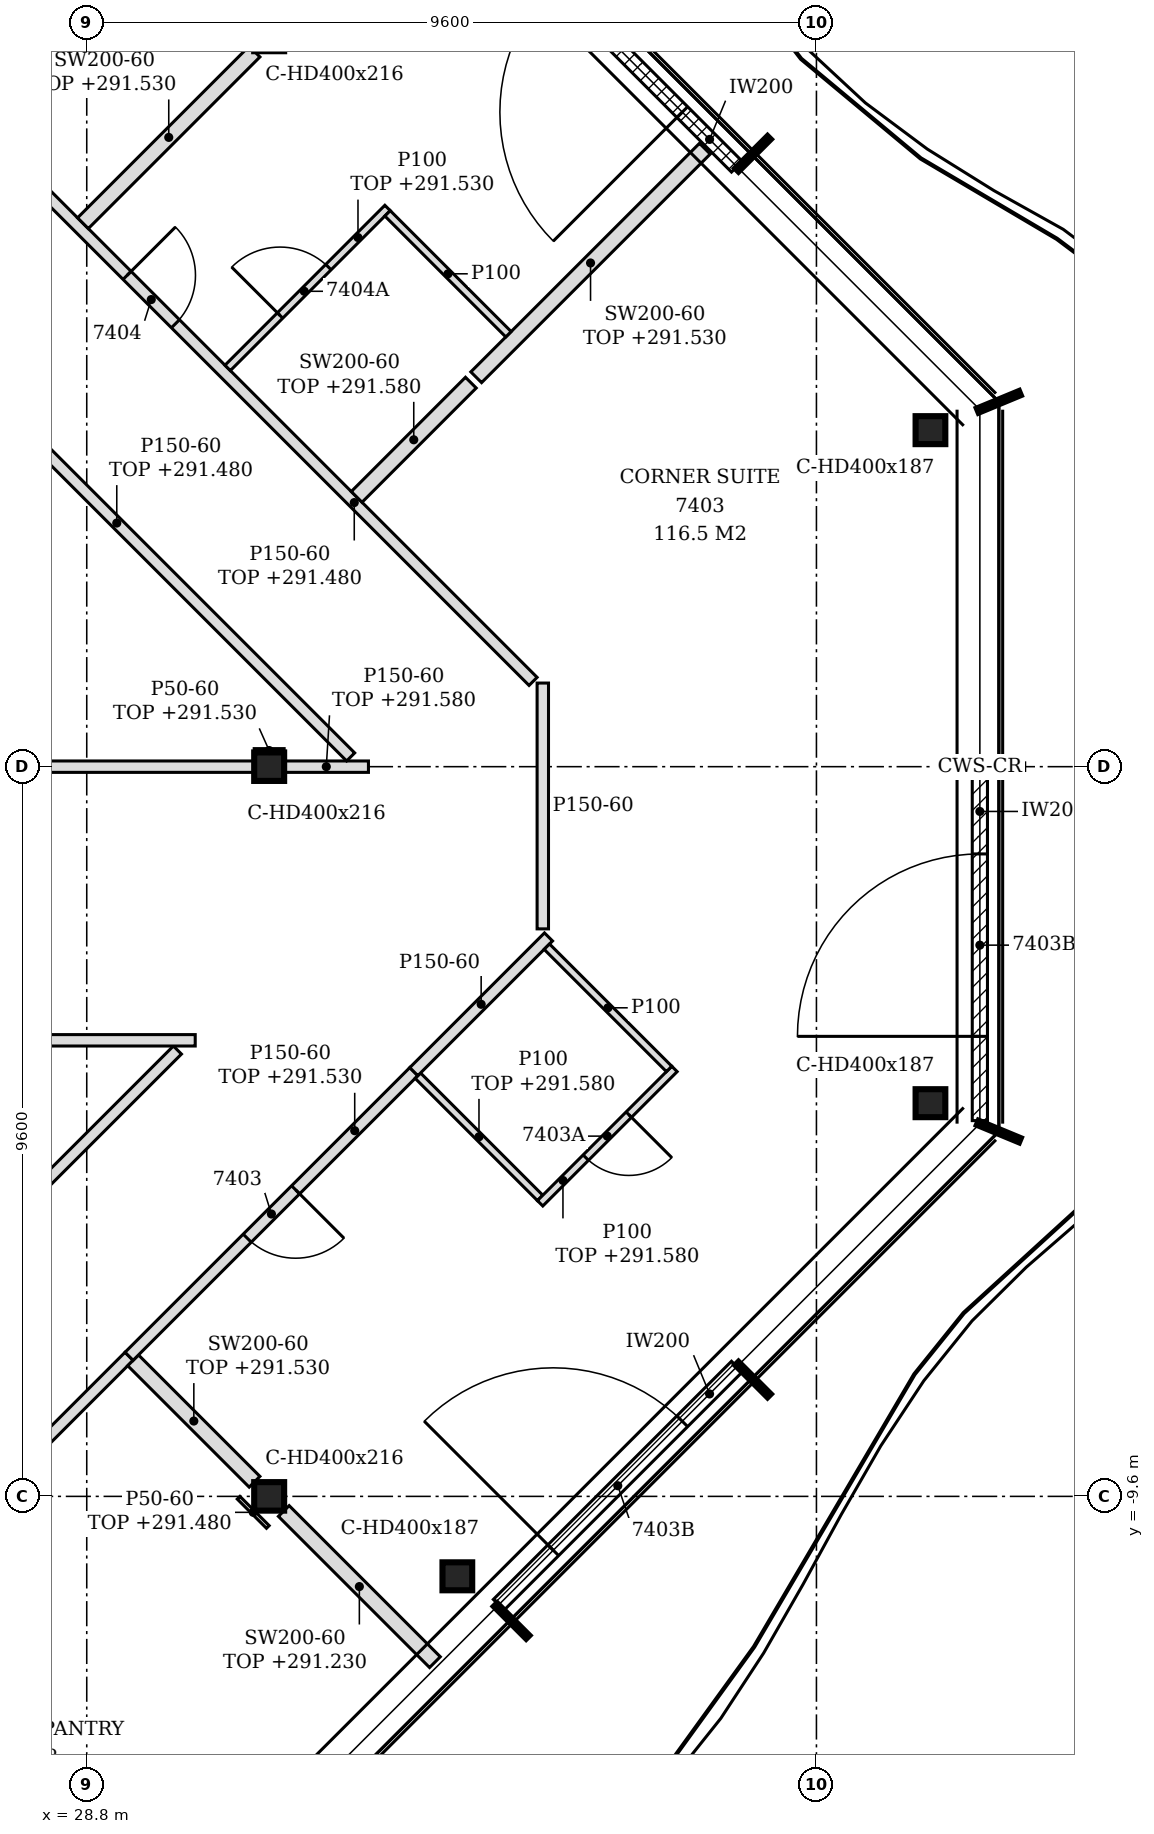
"""IFC4 building model, lengths in metres.
Left out: names, types, materials, properties, quantities, classifications, styles, units other than length and angle.
Written with IfcOpenShell. Run it as: python <this file> out.ifc"""

import sys

from ifc_helpers import new_model, si_unit, direction, frame, frame_2d, origin, origin_2d, place, context, subcontext, project, spatial, polyline, rectangle, i_section, outline, extrude, element, fill, save


model = new_model("IFC4")
c1 = context("Model", 3, precision=1e-05, world=origin(), true_north=direction((0.0, 1.0)))
c2 = subcontext(c1, "Body", "Model", "MODEL_VIEW")
j1 = project(units=[si_unit("LENGTHUNIT", "METRE"), si_unit("PLANEANGLEUNIT", "RADIAN")], contexts=[c1])
p1 = place(None, origin())
s1 = spatial("IfcSite", under=j1, at=p1, CompositionType="ELEMENT")
p2 = place(p1, origin())
s2 = spatial("IfcBuilding", under=s1, at=p2, CompositionType="ELEMENT")
p3 = place(p2, frame((0.0, 0.0, 288.6)))
s3 = spatial("IfcBuildingStorey", under=s2, at=p3, CompositionType="ELEMENT", Elevation=288.6)
for number, where, z_axis, x_axis in (
    (1, (33.676, -10.652, -0.15), (0.0, 0.0, 1.0), (1.0, 0.0, 0.0)),
    (2, (39.9, -4.427, -0.15), (0.0, 0.0, 1.0), (1.0, 0.0, 0.0)),
    (3, (39.9, 4.427, -0.15), (0.0, 0.0, 1.0), (1.0, 0.0, 0.0)),
):
    element("IfcColumn", number, at=place(p3, frame(where, z_axis=z_axis, x_axis=x_axis)), inside=s3, PredefinedType="COLUMN", context=c2, shape_type="SweptSolid", body=[
        extrude(i_section(OverallWidth=0.391, OverallDepth=0.368, WebThickness=0.015, FlangeThickness=0.024, FilletRadius=0.015, at=origin_2d()), origin(), (0.0, 0.0, 1.0), 3.6),
    ])
for number, where, z_axis, x_axis in (
    (4, (31.2, -9.6, -0.15), (0.0, 0.0, 1.0), (1.0, 0.0, 0.0)),
    (5, (31.2, 0.0, -0.15), (0.0, 0.0, 1.0), (1.0, 0.0, 0.0)),
):
    element("IfcColumn", number, at=place(p3, frame(where, z_axis=z_axis, x_axis=x_axis)), inside=s3, PredefinedType="COLUMN", context=c2, shape_type="SweptSolid", body=[
        extrude(i_section(OverallWidth=0.394, OverallDepth=0.375, WebThickness=0.017, FlangeThickness=0.028, FilletRadius=0.015, at=origin_2d()), origin(), (0.0, 0.0, 1.0), 3.6),
    ])
p4 = place(p3, frame((34.22, -11.026, 0.0), z_axis=(0.0, 0.0, 1.0), x_axis=(0.707134329907, 0.707079231393, 0.0)))
e6 = element("IfcWall", 6, at=p4, inside=s3, PredefinedType="NOTDEFINED", context=c2, shape_type="SweptSolid", body=[
    extrude(rectangle(XDim=4.431, YDim=0.2, at=frame_2d((2.215, 0.0))), origin(), (0.0, 0.0, 1.0), 3.45),
])
p5 = place(p4, frame((1.015, 0.0, 0.0)))
e7 = element("IfcOpeningElement", 7, at=p5, cuts=e6, PredefinedType="OPENING", context=c2, shape_type="SweptSolid", body=[
    extrude(rectangle(XDim=2.4, YDim=2.4, at=frame_2d((1.2, 1.2))), frame((0.0, 0.11, 0.0), z_axis=(0.0, -1.0, 0.0), x_axis=(1.0, 0.0, 0.0)), (0.0, 0.0, 1.0), 0.22),
])
p6 = place(p3, frame((40.55, -4.656, 0.0), z_axis=(0.0, 0.0, 1.0), x_axis=(0.0, 1.0, 0.0)))
e8 = element("IfcWall", 8, at=p6, inside=s3, PredefinedType="NOTDEFINED", context=c2, shape_type="SweptSolid", body=[
    extrude(rectangle(XDim=4.626, YDim=0.2, at=frame_2d((2.313, 0.0))), origin(), (0.0, 0.0, 1.0), 3.45),
])
p7 = place(p6, frame((1.108, 0.0, 0.0)))
e9 = element("IfcOpeningElement", 9, at=p7, cuts=e8, PredefinedType="OPENING", context=c2, shape_type="SweptSolid", body=[
    extrude(rectangle(XDim=2.4, YDim=2.4, at=frame_2d((1.2, 1.2))), frame((0.0, 0.11, 0.0), z_axis=(0.0, -1.0, 0.0), x_axis=(1.0, 0.0, 0.0)), (0.0, 0.0, 1.0), 0.22),
])
p8 = place(p3, frame((37.353, 7.893, 0.0), z_axis=(0.0, 0.0, 1.0), x_axis=(-0.707134329907, 0.707079231393, 0.0)))
e10 = element("IfcWall", 10, at=p8, inside=s3, PredefinedType="NOTDEFINED", context=c2, shape_type="SweptSolid", body=[
    extrude(rectangle(XDim=4.431, YDim=0.2, at=frame_2d((2.215, 0.0))), origin(), (0.0, 0.0, 1.0), 3.45),
])
p9 = place(p8, frame((1.016, 0.0, 0.0)))
e11 = element("IfcOpeningElement", 11, at=p9, cuts=e10, PredefinedType="OPENING", context=c2, shape_type="SweptSolid", body=[
    extrude(rectangle(XDim=2.4, YDim=2.4, at=frame_2d((1.2, 1.2))), frame((0.0, 0.11, 0.0), z_axis=(0.0, -1.0, 0.0), x_axis=(1.0, 0.0, 0.0)), (0.0, 0.0, 1.0), 0.22),
])
p10 = place(p3, frame((23.845, -13.27, 0.0), z_axis=(0.0, 0.0, 1.0), x_axis=(0.707044144392, 0.707169412433, 0.0)))
e12 = element("IfcWall", 12, at=p10, inside=s3, PredefinedType="PARTITIONING", context=c2, shape_type="SweptSolid", body=[
    extrude(rectangle(XDim=7.796, YDim=0.15, at=frame_2d((3.898, 0.0))), origin(), (0.0, 0.0, 1.0), 2.88),
])
p11 = place(p10, frame((3.448, 0.0, 0.0)))
e13 = element("IfcOpeningElement", 13, at=p11, cuts=e12, PredefinedType="OPENING", context=c2, shape_type="SweptSolid", body=[
    extrude(rectangle(XDim=0.9, YDim=2.1, at=frame_2d((0.45, 1.05))), frame((0.0, 0.085, 0.0), z_axis=(0.0, -1.0, 0.0), x_axis=(1.0, 0.0, 0.0)), (0.0, 0.0, 1.0), 0.17),
])
p12 = place(p3, frame((33.381, -11.781, 0.0), z_axis=(0.0, 0.0, 1.0), x_axis=(-0.707106781187, 0.707106781187, 0.0)))
e14 = element("IfcWall", 14, at=p12, inside=s3, PredefinedType="PARTITIONING", context=c2, shape_type="SweptSolid", body=[
    extrude(rectangle(XDim=2.812, YDim=0.2, at=frame_2d((1.406, 0.0))), origin(), (0.0, 0.0, 1.0), 2.63),
])
p13 = place(p3, frame((31.008, -9.408, 0.0), z_axis=(0.0, 0.0, 1.0), x_axis=(-0.707160802102, 0.707052756143, 0.0)))
e15 = element("IfcWall", 15, at=p13, inside=s3, PredefinedType="PARTITIONING", context=c2, shape_type="SweptSolid", body=[
    extrude(rectangle(XDim=2.26, YDim=0.2, at=frame_2d((1.13, 0.0))), origin(), (0.0, 0.0, 1.0), 2.93),
])
p14 = place(p3, frame((25.449, -8.272, 0.0), z_axis=(0.0, 0.0, 1.0), x_axis=(0.707106781187, 0.707106781187, 0.0)))
e16 = element("IfcWall", 16, at=p14, inside=s3, PredefinedType="PARTITIONING", context=c2, shape_type="SweptSolid", body=[
    extrude(rectangle(XDim=6.426, YDim=0.15, at=frame_2d((3.213, 0.0))), origin(), (0.0, 0.0, 1.0), 2.88),
])
p15 = place(p3, frame((29.357, -7.757, 0.0), z_axis=(0.0, 0.0, 1.0), x_axis=(0.707198954395, 0.707014595961, 0.0)))
e17 = element("IfcWall", 17, at=p15, inside=s3, PredefinedType="PARTITIONING", context=c2, shape_type="SweptSolid", body=[
    extrude(rectangle(XDim=5.297, YDim=0.15, at=frame_2d((2.648, 0.0))), origin(), (0.0, 0.0, 1.0), 2.93),
])
p16 = place(p15, frame((2.198, 0.0, 0.0)))
e18 = element("IfcOpeningElement", 18, at=p16, cuts=e17, PredefinedType="OPENING", context=c2, shape_type="SweptSolid", body=[
    extrude(rectangle(XDim=0.9, YDim=2.1, at=frame_2d((0.45, 1.05))), frame((0.0, 0.085, 0.0), z_axis=(0.0, -1.0, 0.0), x_axis=(1.0, 0.0, 0.0)), (0.0, 0.0, 1.0), 0.17),
])
p17 = place(p3, frame((34.765, -5.674, 0.0), z_axis=(0.0, 0.0, 1.0), x_axis=(-0.707106781187, 0.707106781187, 0.0)))
e19 = element("IfcWall", 19, at=p17, inside=s3, PredefinedType="PARTITIONING", context=c2, shape_type="SweptSolid", body=[
    extrude(rectangle(XDim=2.275, YDim=0.1, at=frame_2d((1.137, 0.0))), origin(), (0.0, 0.0, 1.0), 2.98),
])
p18 = place(p3, frame((34.765, -5.744, 0.0), z_axis=(0.0, 0.0, 1.0), x_axis=(0.707106781187, 0.707106781187, 0.0)))
e20 = element("IfcWall", 20, at=p18, inside=s3, PredefinedType="PARTITIONING", context=c2, shape_type="SweptSolid", body=[
    extrude(rectangle(XDim=2.5, YDim=0.1, at=frame_2d((1.25, 0.0))), origin(), (0.0, 0.0, 1.0), 2.98),
])
p19 = place(p18, frame((0.85, 0.0, 0.0)))
e21 = element("IfcOpeningElement", 21, at=p19, cuts=e20, PredefinedType="OPENING", context=c2, shape_type="SweptSolid", body=[
    extrude(rectangle(XDim=0.8, YDim=2.1, at=frame_2d((0.4, 1.05))), frame((0.0, 0.06, 0.0), z_axis=(0.0, -1.0, 0.0), x_axis=(1.0, 0.0, 0.0)), (0.0, 0.0, 1.0), 0.12),
])
p20 = place(p3, frame((33.103, -4.012, 0.0), z_axis=(0.0, 0.0, 1.0), x_axis=(0.707106781187, 0.707106781187, 0.0)))
e22 = element("IfcWall", 22, at=p20, inside=s3, PredefinedType="PARTITIONING", context=c2, shape_type="SweptSolid", body=[
    extrude(rectangle(XDim=2.506, YDim=0.15, at=frame_2d((1.253, 0.0))), origin(), (0.0, 0.0, 1.0), 3.45),
])
p21 = place(p3, frame((36.462, -3.977, 0.0), z_axis=(0.0, 0.0, 1.0), x_axis=(-0.707106781187, 0.707106781187, 0.0)))
e23 = element("IfcWall", 23, at=p21, inside=s3, PredefinedType="PARTITIONING", context=c2, shape_type="SweptSolid", body=[
    extrude(rectangle(XDim=2.275, YDim=0.1, at=frame_2d((1.137, 0.0))), origin(), (0.0, 0.0, 1.0), 3.45),
])
p22 = place(p3, frame((19.125, -3.6, 0.0), z_axis=(0.0, 0.0, 1.0), x_axis=(1.0, 0.0, 0.0)))
e24 = element("IfcWall", 24, at=p22, inside=s3, PredefinedType="PARTITIONING", context=c2, shape_type="SweptSolid", body=[
    extrude(outline(polyline([(0.0, 0.0), (11.102, 0.0), (11.102, 3.45), (0.225, 3.45), (0.223, 2.83), (0.0, 2.83), (0.0, 0.0)])), frame((0.0, 0.075, 0.0), z_axis=(0.0, -1.0, 0.0), x_axis=(1.0, 0.0, 0.0)), (0.0, 0.0, 1.0), 0.15),
])
p23 = place(p22, frame((5.086, 0.0, 0.0)))
e25 = element("IfcOpeningElement", 25, at=p23, cuts=e24, PredefinedType="OPENING", context=c2, shape_type="SweptSolid", body=[
    extrude(rectangle(XDim=0.9, YDim=2.1, at=frame_2d((0.45, 1.05))), frame((0.0, 0.085, 0.0), z_axis=(0.0, -1.0, 0.0), x_axis=(1.0, 0.0, 0.0)), (0.0, 0.0, 1.0), 0.17),
])
p24 = place(p3, frame((34.8, -2.134, 0.0), z_axis=(0.0, 0.0, 1.0), x_axis=(0.0, 1.0, 0.0)))
e26 = element("IfcWall", 26, at=p24, inside=s3, PredefinedType="PARTITIONING", context=c2, shape_type="SweptSolid", body=[
    extrude(outline(polyline([(0.0, 0.0), (3.234, 0.0), (3.234, 3.45), (2.229, 3.45), (2.227, 2.98), (2.039, 2.98), (2.037, 3.45), (0.0, 3.45), (0.0, 0.0)])), frame((0.0, 0.075, 0.0), z_axis=(0.0, -1.0, 0.0), x_axis=(1.0, 0.0, 0.0)), (0.0, 0.0, 1.0), 0.15),
])
p25 = place(p3, frame((19.125, 0.0, 0.0), z_axis=(0.0, 0.0, 1.0), x_axis=(1.0, 0.0, 0.0)))
e27 = element("IfcWall", 27, at=p25, inside=s3, PredefinedType="PARTITIONING", context=c2, shape_type="SweptSolid", body=[
    extrude(outline(polyline([(0.0, 0.0), (11.878, 0.0), (11.878, 2.88), (0.225, 2.88), (0.223, 2.83), (0.0, 2.83), (0.0, 0.0)])), frame((0.0, 0.075, 0.0), z_axis=(0.0, -1.0, 0.0), x_axis=(1.0, 0.0, 0.0)), (0.0, 0.0, 1.0), 0.15),
])
p26 = place(p3, frame((31.397, 0.0, 0.0), z_axis=(0.0, 0.0, 1.0), x_axis=(1.0, 0.0, 0.0)))
e28 = element("IfcWall", 28, at=p26, inside=s3, PredefinedType="PARTITIONING", context=c2, shape_type="SweptSolid", body=[
    extrude(rectangle(XDim=1.109, YDim=0.15, at=frame_2d((0.555, 0.0))), origin(), (0.0, 0.0, 1.0), 2.98),
])
p27 = place(p3, frame((32.272, 0.128, 0.0), z_axis=(0.0, 0.0, 1.0), x_axis=(-0.707106781187, 0.707106781187, 0.0)))
e29 = element("IfcWall", 29, at=p27, inside=s3, PredefinedType="PARTITIONING", context=c2, shape_type="SweptSolid", body=[
    extrude(rectangle(XDim=18.215, YDim=0.15, at=frame_2d((9.107, 0.0))), origin(), (0.0, 0.0, 1.0), 2.88),
])
p28 = place(p27, frame((8.703, 0.0, 0.0)))
e30 = element("IfcOpeningElement", 30, at=p28, cuts=e29, PredefinedType="OPENING", context=c2, shape_type="SweptSolid", body=[
    extrude(rectangle(XDim=0.9, YDim=2.1, at=frame_2d((0.45, 1.05))), frame((0.0, 0.085, 0.0), z_axis=(0.0, -1.0, 0.0), x_axis=(1.0, 0.0, 0.0)), (0.0, 0.0, 1.0), 0.17),
])
p29 = place(p3, frame((34.672, 1.122, 0.0), z_axis=(0.0, 0.0, 1.0), x_axis=(-0.707114004264, 0.707099558035, 0.0)))
e31 = element("IfcWall", 31, at=p29, inside=s3, PredefinedType="PARTITIONING", context=c2, shape_type="SweptSolid", body=[
    extrude(rectangle(XDim=16.9, YDim=0.15, at=frame_2d((8.45, 0.0))), origin(), (0.0, 0.0, 1.0), 2.88),
])
p30 = place(p29, frame((6.654, 0.0, 0.0)))
e32 = element("IfcOpeningElement", 32, at=p30, cuts=e31, PredefinedType="OPENING", context=c2, shape_type="SweptSolid", body=[
    extrude(rectangle(XDim=0.9, YDim=2.1, at=frame_2d((0.45, 1.05))), frame((0.0, 0.085, 0.0), z_axis=(0.0, -1.0, 0.0), x_axis=(1.0, 0.0, 0.0)), (0.0, 0.0, 1.0), 0.17),
])
p31 = place(p29, frame((11.897, 0.0, 0.0)))
e33 = element("IfcOpeningElement", 33, at=p31, cuts=e31, PredefinedType="OPENING", context=c2, shape_type="SweptSolid", body=[
    extrude(rectangle(XDim=0.9, YDim=2.1, at=frame_2d((0.45, 1.05))), frame((0.0, 0.085, 0.0), z_axis=(0.0, -1.0, 0.0), x_axis=(1.0, 0.0, 0.0)), (0.0, 0.0, 1.0), 0.17),
])
p32 = place(p3, frame((32.351, 3.549, 0.0), z_axis=(0.0, 0.0, 1.0), x_axis=(0.706934449228, 0.707279071156, 0.0)))
e34 = element("IfcWall", 34, at=p32, inside=s3, PredefinedType="PARTITIONING", context=c2, shape_type="SweptSolid", body=[
    extrude(rectangle(XDim=2.125, YDim=0.2, at=frame_2d((1.062, 0.0))), origin(), (0.0, 0.0, 1.0), 2.98),
])
p33 = place(p3, frame((33.924, 5.123, 0.0), z_axis=(0.0, 0.0, 1.0), x_axis=(0.70722156193, 0.706991981809, 0.0)))
e35 = element("IfcWall", 35, at=p33, inside=s3, PredefinedType="PARTITIONING", context=c2, shape_type="SweptSolid", body=[
    extrude(rectangle(XDim=4.254, YDim=0.2, at=frame_2d((2.127, 0.0))), origin(), (0.0, 0.0, 1.0), 2.93),
])
p34 = place(p3, frame((30.654, 5.246, 0.0), z_axis=(0.0, 0.0, 1.0), x_axis=(0.706942643129, 0.707270881152, 0.0)))
e36 = element("IfcWall", 36, at=p34, inside=s3, PredefinedType="PARTITIONING", context=c2, shape_type="SweptSolid", body=[
    extrude(rectangle(XDim=2.975, YDim=0.1, at=frame_2d((1.488, 0.0))), origin(), (0.0, 0.0, 1.0), 2.93),
])
p35 = place(p34, frame((0.975, 0.0, 0.0)))
e37 = element("IfcOpeningElement", 37, at=p35, cuts=e36, PredefinedType="OPENING", context=c2, shape_type="SweptSolid", body=[
    extrude(rectangle(XDim=0.9, YDim=2.1, at=frame_2d((0.45, 1.05))), frame((0.0, 0.06, 0.0), z_axis=(0.0, -1.0, 0.0), x_axis=(1.0, 0.0, 0.0)), (0.0, 0.0, 1.0), 0.12),
])
p36 = place(p3, frame((34.348, 5.689, 0.0), z_axis=(0.0, 0.0, 1.0), x_axis=(-0.70716103421, 0.707052524, 0.0)))
e38 = element("IfcWall", 38, at=p36, inside=s3, PredefinedType="PARTITIONING", context=c2, shape_type="SweptSolid", body=[
    extrude(rectangle(XDim=2.25, YDim=0.1, at=frame_2d((1.125, 0.0))), origin(), (0.0, 0.0, 1.0), 3.45),
])
p37 = place(p3, frame((28.75, 7.15, 0.0), z_axis=(0.0, 0.0, 1.0), x_axis=(0.707106781187, 0.707106781187, 0.0)))
e39 = element("IfcWall", 39, at=p37, inside=s3, PredefinedType="PARTITIONING", context=c2, shape_type="SweptSolid", body=[
    extrude(rectangle(XDim=3.193, YDim=0.2, at=frame_2d((1.597, 0.0))), origin(), (0.0, 0.0, 1.0), 2.93),
])
p38 = place(p3, frame((31.182, -10.002, 0.0), z_axis=(0.0, 0.0, 1.0), x_axis=(-0.707106781187, 0.707106781187, 0.0)))
e40 = element("IfcWall", 40, at=p38, inside=s3, PredefinedType="PARTITIONING", context=c2, shape_type="SweptSolid", body=[
    extrude(rectangle(XDim=0.544, YDim=0.05, at=frame_2d((0.272, 0.0))), origin(), (0.0, 0.0, 1.0), 2.88),
])
p39 = place(p3, frame((31.003, 0.212, 0.0), z_axis=(0.0, 0.0, 1.0), x_axis=(1.0, 0.0, 0.0)))
e41 = element("IfcWall", 41, at=p39, inside=s3, PredefinedType="PARTITIONING", context=c2, shape_type="SweptSolid", body=[
    extrude(rectangle(XDim=0.394, YDim=0.05, at=frame_2d((0.197, 0.0))), origin(), (0.0, 0.0, 1.0), 2.93),
])
p40 = place(p5, origin())
e42 = element("IfcDoor", 42, at=p40, inside=s3, OperationType="SINGLE_SWING_LEFT", PredefinedType="DOOR", context=c2, shape_type="SweptSolid", body=[
    extrude(rectangle(XDim=2.4, YDim=2.4, at=frame_2d((1.2, 1.2))), frame((0.0, 0.025, 0.0), z_axis=(0.0, -1.0, 0.0), x_axis=(1.0, 0.0, 0.0)), (0.0, 0.0, 1.0), 0.05),
])
fill(e7, e42)
p41 = place(p7, origin())
e43 = element("IfcDoor", 43, at=p41, inside=s3, OperationType="SINGLE_SWING_LEFT", PredefinedType="DOOR", context=c2, shape_type="SweptSolid", body=[
    extrude(rectangle(XDim=2.4, YDim=2.4, at=frame_2d((1.2, 1.2))), frame((0.0, 0.025, 0.0), z_axis=(0.0, -1.0, 0.0), x_axis=(1.0, 0.0, 0.0)), (0.0, 0.0, 1.0), 0.05),
])
fill(e9, e43)
p42 = place(p9, origin())
e44 = element("IfcDoor", 44, at=p42, inside=s3, OperationType="SINGLE_SWING_LEFT", PredefinedType="DOOR", context=c2, shape_type="SweptSolid", body=[
    extrude(rectangle(XDim=2.4, YDim=2.4, at=frame_2d((1.2, 1.2))), frame((0.0, 0.025, 0.0), z_axis=(0.0, -1.0, 0.0), x_axis=(1.0, 0.0, 0.0)), (0.0, 0.0, 1.0), 0.05),
])
fill(e11, e44)
p43 = place(p16, frame((0.9, 0.0, 0.0), z_axis=(0.0, 0.0, 1.0), x_axis=(-1.0, 0.0, 0.0)))
e45 = element("IfcDoor", 45, at=p43, inside=s3, OperationType="SINGLE_SWING_LEFT", PredefinedType="DOOR", context=c2, shape_type="SweptSolid", body=[
    extrude(rectangle(XDim=0.9, YDim=2.1, at=frame_2d((0.45, 1.05))), frame((0.0, 0.025, 0.0), z_axis=(0.0, -1.0, 0.0), x_axis=(1.0, 0.0, 0.0)), (0.0, 0.0, 1.0), 0.05),
])
fill(e18, e45)
p44 = place(p19, frame((0.8, 0.0, 0.0), z_axis=(0.0, 0.0, 1.0), x_axis=(-1.0, 0.0, 0.0)))
e46 = element("IfcDoor", 46, at=p44, inside=s3, OperationType="SINGLE_SWING_LEFT", PredefinedType="DOOR", context=c2, shape_type="SweptSolid", body=[
    extrude(rectangle(XDim=0.8, YDim=2.1, at=frame_2d((0.4, 1.05))), frame((0.0, 0.025, 0.0), z_axis=(0.0, -1.0, 0.0), x_axis=(1.0, 0.0, 0.0)), (0.0, 0.0, 1.0), 0.05),
])
fill(e21, e46)
p45 = place(p30, frame((0.9, 0.0, 0.0), z_axis=(0.0, 0.0, 1.0), x_axis=(-1.0, 0.0, 0.0)))
e47 = element("IfcDoor", 47, at=p45, inside=s3, OperationType="SINGLE_SWING_LEFT", PredefinedType="DOOR", context=c2, shape_type="SweptSolid", body=[
    extrude(rectangle(XDim=0.9, YDim=2.1, at=frame_2d((0.45, 1.05))), frame((0.0, 0.025, 0.0), z_axis=(0.0, -1.0, 0.0), x_axis=(1.0, 0.0, 0.0)), (0.0, 0.0, 1.0), 0.05),
])
fill(e32, e47)
p46 = place(p35, origin())
e48 = element("IfcDoor", 48, at=p46, inside=s3, OperationType="SINGLE_SWING_LEFT", PredefinedType="DOOR", context=c2, shape_type="SweptSolid", body=[
    extrude(rectangle(XDim=0.9, YDim=2.1, at=frame_2d((0.45, 1.05))), frame((0.0, 0.025, 0.0), z_axis=(0.0, -1.0, 0.0), x_axis=(1.0, 0.0, 0.0)), (0.0, 0.0, 1.0), 0.05),
])
fill(e37, e48)
save(model, sys.argv[1])
